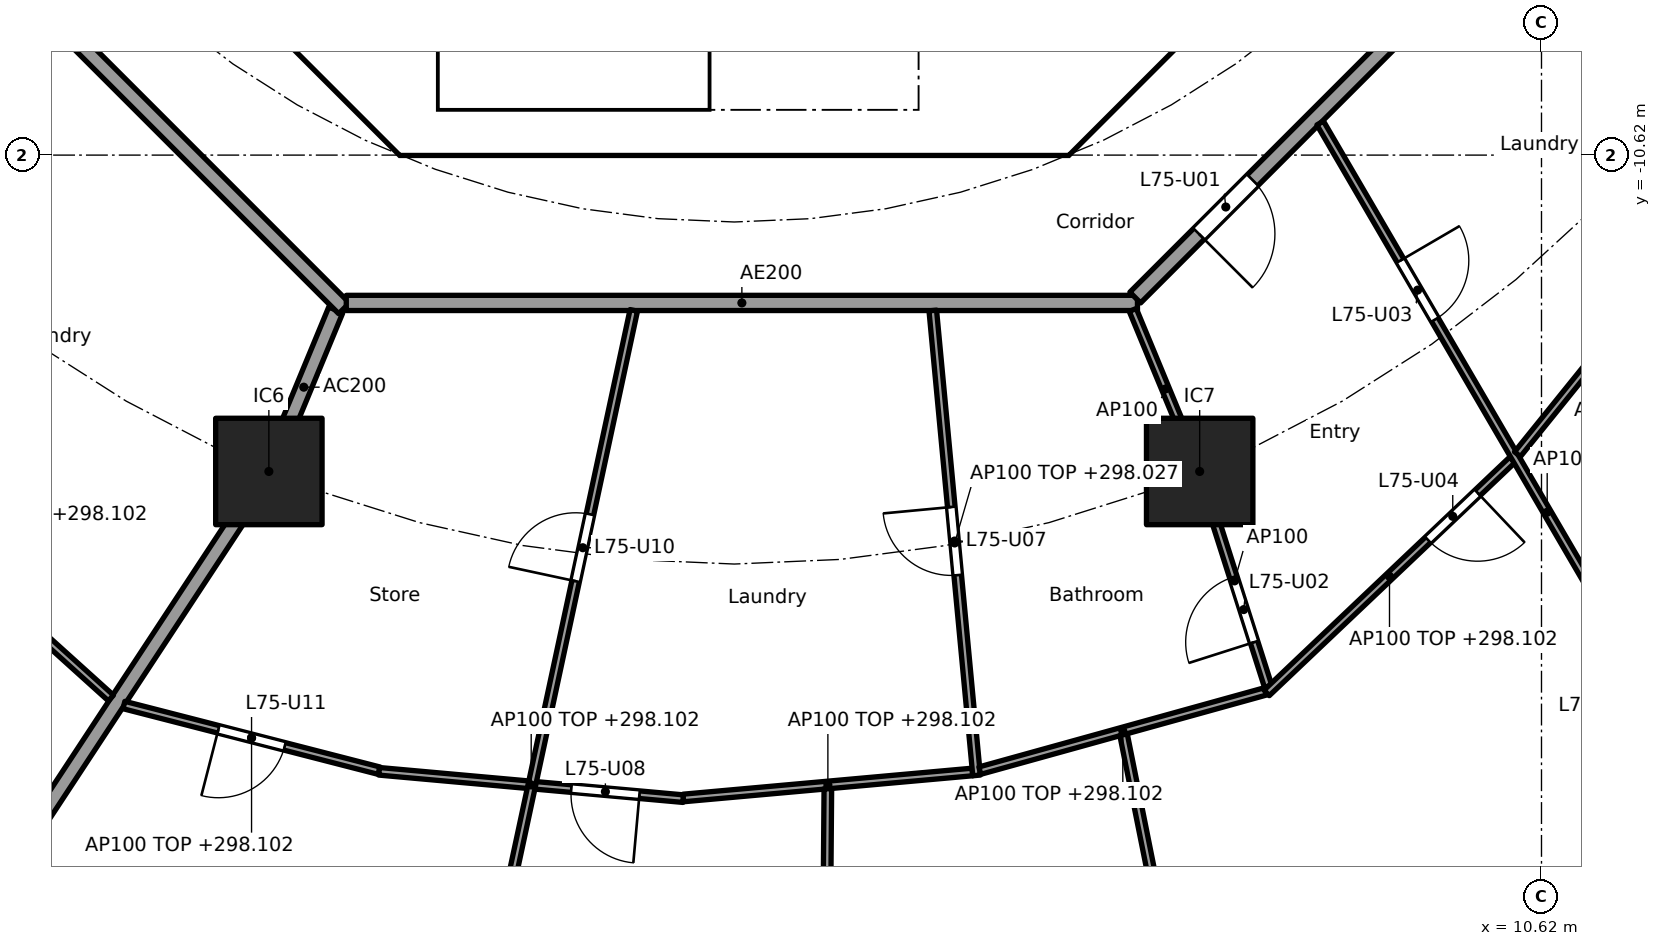
"""IFC4 building model, lengths in metres.
Left out: names, types, materials, properties, quantities, classifications, styles, units other than length and angle.
Written with IfcOpenShell. Run it as: python <this file> out.ifc"""

import sys

from ifc_helpers import new_model, si_unit, direction, frame, frame_2d, origin, origin_2d, place, context, subcontext, project, spatial, polyline, rectangle, outline, extrude, element, fill, save


model = new_model("IFC4")
c1 = context("Model", 3, precision=1e-05, world=origin(), true_north=direction((0.0, 1.0)))
c2 = subcontext(c1, "Body", "Model", "MODEL_VIEW")
j1 = project(units=[si_unit("LENGTHUNIT", "METRE"), si_unit("PLANEANGLEUNIT", "RADIAN")], contexts=[c1])
p1 = place(None, origin())
s1 = spatial("IfcSite", under=j1, at=p1, CompositionType="ELEMENT")
p2 = place(p1, origin())
s2 = spatial("IfcBuilding", under=s1, at=p2, CompositionType="ELEMENT")
p3 = place(p2, frame((0.0, 0.0, 295.5)))
s3 = spatial("IfcBuildingStorey", under=s2, at=p3, CompositionType="ELEMENT", Elevation=295.5)
for number, where, z_axis, x_axis in (
    (1, (-6.123, -14.782, 0.0), (0.0, 0.0, 1.0), (1.0, 0.0, 0.0)),
    (2, (6.123, -14.782, 0.0), (0.0, 0.0, 1.0), (1.0, 0.0, 0.0)),
):
    element("IfcColumn", number, at=place(p3, frame(where, z_axis=z_axis, x_axis=x_axis)), inside=s3, PredefinedType="COLUMN", context=c2, shape_type="SweptSolid", body=[
        extrude(rectangle(XDim=1.4, YDim=1.4, at=origin_2d()), origin(), (0.0, 0.0, 1.0), 3.7),
    ])
p4 = place(p3, frame((-9.988, -4.613, 0.0), z_axis=(0.0, 0.0, 1.0), x_axis=(0.707106781187, -0.707106781187, 0.0)))
e3 = element("IfcWall", 3, at=p4, inside=s3, PredefinedType="SHEAR", context=c2, shape_type="SweptSolid", body=[
    extrude(rectangle(XDim=7.602, YDim=0.6, at=frame_2d((3.801, 0.0))), origin(), (0.0, 0.0, 1.0), 3.28),
])
p5 = place(p4, frame((6.151, 0.0, 0.0)))
e4 = element("IfcOpeningElement", 4, at=p5, cuts=e3, PredefinedType="OPENING", context=c2, shape_type="SweptSolid", body=[
    extrude(rectangle(XDim=1.1, YDim=2.1, at=frame_2d((0.55, 1.05))), frame((0.0, 0.31, 0.0), z_axis=(0.0, -1.0, 0.0), x_axis=(1.0, 0.0, 0.0)), (0.0, 0.0, 1.0), 0.62),
])
p6 = place(p3, frame((4.613, -9.988, 0.0), z_axis=(0.0, 0.0, 1.0), x_axis=(0.707106781187, 0.707106781187, 0.0)))
e5 = element("IfcWall", 5, at=p6, inside=s3, PredefinedType="SHEAR", context=c2, shape_type="SweptSolid", body=[
    extrude(rectangle(XDim=7.602, YDim=0.6, at=frame_2d((3.801, 0.0))), origin(), (0.0, 0.0, 1.0), 3.28),
])
p7 = place(p6, frame((3.201, 0.0, 0.0)))
e6 = element("IfcOpeningElement", 6, at=p7, cuts=e5, PredefinedType="OPENING", context=c2, shape_type="SweptSolid", body=[
    extrude(rectangle(XDim=1.2, YDim=2.1, at=frame_2d((0.6, 1.05))), frame((0.0, 0.31, 0.0), z_axis=(0.0, -1.0, 0.0), x_axis=(1.0, 0.0, 0.0)), (0.0, 0.0, 1.0), 0.62),
])
p8 = place(p3, frame((4.0, -10.025, 0.0), z_axis=(0.0, 0.0, 1.0), x_axis=(0.0, 1.0, 0.0)))
e7 = element("IfcWall", 7, at=p8, inside=s3, PredefinedType="SOLIDWALL", context=c2, shape_type="SweptSolid", body=[
    extrude(rectangle(XDim=3.0, YDim=0.2, at=frame_2d((1.5, 0.0))), origin(), (0.0, 0.0, 1.0), 3.28),
])
p9 = place(p8, frame((0.975, 0.0, 0.0)))
e8 = element("IfcOpeningElement", 8, at=p9, cuts=e7, PredefinedType="OPENING", context=c2, shape_type="SweptSolid", body=[
    extrude(rectangle(XDim=1.1, YDim=2.1, at=frame_2d((0.55, 1.05))), frame((0.0, 0.11, 0.0), z_axis=(0.0, -1.0, 0.0), x_axis=(1.0, 0.0, 0.0)), (0.0, 0.0, 1.0), 0.22),
])
p10 = place(p3, origin())
e9 = element("IfcWall", 9, at=p10, inside=s3, PredefinedType="SHEAR", context=c2, shape_type="SweptSolid", body=[
    extrude(outline(polyline([(-4.152, -10.025), (4.152, -10.025), (4.401, -9.776), (4.825, -10.2), (4.401, -10.625), (-4.401, -10.625), (-4.825, -10.2), (-4.401, -9.776), (-4.152, -10.025)])), origin(), (0.0, 0.0, 1.0), 3.28),
])
p11 = place(p3, origin())
e10 = element("IfcWall", 10, at=p11, inside=s3, PredefinedType="SOLIDWALL", context=c2, shape_type="SweptSolid", body=[
    extrude(outline(polyline([(-3.9, -10.025), (-4.1, -10.025), (-4.1, -7.025), (-3.9, -7.025), (-3.9, -10.025)])), origin(), (0.0, 0.0, 1.0), 3.28),
])
p12 = place(p3, frame((-5.243, -12.657, 0.0), z_axis=(0.0, 0.0, 1.0), x_axis=(-0.382770106157, -0.923843626288, 0.0)))
e11 = element("IfcWall", 11, at=p12, inside=s3, PredefinedType="PARTITIONING", context=c2, shape_type="SweptSolid", body=[
    extrude(rectangle(XDim=2.199, YDim=0.2, at=frame_2d((1.1, 0.0))), origin(), (0.0, 0.0, 1.0), 3.28),
])
p13 = place(p3, frame((-6.151, -14.824, 0.0), z_axis=(0.0, 0.0, 1.0), x_axis=(-0.549345577828, -0.835595258556, 0.0)))
e12 = element("IfcWall", 12, at=p13, inside=s3, PredefinedType="PARTITIONING", context=c2, shape_type="SweptSolid", body=[
    extrude(rectangle(XDim=11.62, YDim=0.2, at=frame_2d((5.81, 0.0))), origin(), (0.0, 0.0, 1.0), 2.602),
])
p14 = place(p3, frame((-12.635, -5.134, 0.0), z_axis=(0.0, 0.0, 1.0), x_axis=(0.707106781187, -0.707106781187, 0.0)))
e13 = element("IfcWall", 13, at=p14, inside=s3, PredefinedType="PARTITIONING", context=c2, shape_type="SweptSolid", body=[
    extrude(rectangle(XDim=10.609, YDim=0.2, at=frame_2d((5.305, 0.0))), origin(), (0.0, 0.0, 1.0), 3.28),
])
p15 = place(p3, frame((-5.104, -12.565, 0.0), z_axis=(0.0, 0.0, 1.0), x_axis=(1.0, 0.0, 0.0)))
e14 = element("IfcWall", 14, at=p15, inside=s3, PredefinedType="PARTITIONING", context=c2, shape_type="SweptSolid", body=[
    extrude(rectangle(XDim=10.409, YDim=0.2, at=frame_2d((5.205, 0.0))), origin(), (0.0, 0.0, 1.0), 3.28),
])
p16 = place(p3, frame((5.275, -12.494, 0.0), z_axis=(0.0, 0.0, 1.0), x_axis=(0.707106781187, 0.707106781187, 0.0)))
e15 = element("IfcWall", 15, at=p16, inside=s3, PredefinedType="PARTITIONING", context=c2, shape_type="SweptSolid", body=[
    extrude(rectangle(XDim=10.409, YDim=0.2, at=frame_2d((5.205, 0.0))), origin(), (0.0, 0.0, 1.0), 3.28),
])
p17 = place(p16, frame((1.185, 0.0, 0.0)))
e16 = element("IfcOpeningElement", 16, at=p17, cuts=e15, PredefinedType="OPENING", context=c2, shape_type="SweptSolid", body=[
    extrude(rectangle(XDim=1.0, YDim=2.1, at=frame_2d((0.5, 1.05))), frame((0.0, 0.11, 0.0), z_axis=(0.0, -1.0, 0.0), x_axis=(1.0, 0.0, 0.0)), (0.0, 0.0, 1.0), 0.22),
])
p18 = place(p3, frame((-8.958, -8.952, 0.0), z_axis=(0.0, 0.0, 1.0), x_axis=(-0.73876526954, -0.673962815385, 0.0)))
e17 = element("IfcWall", 17, at=p18, inside=s3, PredefinedType="PARTITIONING", context=c2, shape_type="SweptSolid", body=[
    extrude(rectangle(XDim=5.647, YDim=0.1, at=frame_2d((2.824, 0.0))), origin(), (0.0, 0.0, 1.0), 2.527),
])
p19 = place(p3, frame((-11.676, -14.628, 0.0), z_axis=(0.0, 0.0, 1.0), x_axis=(0.74245829867, -0.669892285921, 0.0)))
e18 = element("IfcWall", 18, at=p19, inside=s3, PredefinedType="PARTITIONING", context=c2, shape_type="SweptSolid", body=[
    extrude(rectangle(XDim=4.68, YDim=0.1, at=frame_2d((2.34, 0.0))), origin(), (0.0, 0.0, 1.0), 2.602),
])
p20 = place(p3, frame((-8.03, -17.854, 0.0), z_axis=(0.0, 0.0, 1.0), x_axis=(0.968441967324, -0.249239154077, 0.0)))
e19 = element("IfcWall", 19, at=p20, inside=s3, PredefinedType="PARTITIONING", context=c2, shape_type="SweptSolid", body=[
    extrude(rectangle(XDim=3.468, YDim=0.1, at=frame_2d((1.734, 0.0))), origin(), (0.0, 0.0, 1.0), 2.602),
])
p21 = place(p20, frame((1.284, 0.0, 0.0)))
e20 = element("IfcOpeningElement", 20, at=p21, cuts=e19, PredefinedType="OPENING", context=c2, shape_type="SweptSolid", body=[
    extrude(rectangle(XDim=0.9, YDim=2.1, at=frame_2d((0.45, 1.05))), frame((0.0, 0.06, 0.0), z_axis=(0.0, -1.0, 0.0), x_axis=(1.0, 0.0, 0.0)), (0.0, 0.0, 1.0), 0.12),
])
p22 = place(p3, frame((-4.673, -18.727, 0.0), z_axis=(0.0, 0.0, 1.0), x_axis=(0.995982840882, -0.089544294447, 0.0)))
e21 = element("IfcWall", 21, at=p22, inside=s3, PredefinedType="PARTITIONING", context=c2, shape_type="SweptSolid", body=[
    extrude(rectangle(XDim=4.019, YDim=0.1, at=frame_2d((2.009, 0.0))), origin(), (0.0, 0.0, 1.0), 2.602),
])
p23 = place(p22, frame((2.539, 0.0, 0.0)))
e22 = element("IfcOpeningElement", 22, at=p23, cuts=e21, PredefinedType="OPENING", context=c2, shape_type="SweptSolid", body=[
    extrude(rectangle(XDim=0.9, YDim=2.1, at=frame_2d((0.45, 1.05))), frame((0.0, 0.06, 0.0), z_axis=(0.0, -1.0, 0.0), x_axis=(1.0, 0.0, 0.0)), (0.0, 0.0, 1.0), 0.12),
])
p24 = place(p3, frame((-1.322, -12.663, 0.0), z_axis=(0.0, 0.0, 1.0), x_axis=(-0.209957681159, -0.97771047459, 0.0)))
e23 = element("IfcWall", 23, at=p24, inside=s3, PredefinedType="PARTITIONING", context=c2, shape_type="SweptSolid", body=[
    extrude(rectangle(XDim=16.299, YDim=0.1, at=frame_2d((8.149, 0.0))), origin(), (0.0, 0.0, 1.0), 2.527),
])
p25 = place(p24, frame((2.744, 0.0, 0.0)))
e24 = element("IfcOpeningElement", 24, at=p25, cuts=e23, PredefinedType="OPENING", context=c2, shape_type="SweptSolid", body=[
    extrude(rectangle(XDim=0.9, YDim=2.1, at=frame_2d((0.45, 1.05))), frame((0.0, 0.06, 0.0), z_axis=(0.0, -1.0, 0.0), x_axis=(1.0, 0.0, 0.0)), (0.0, 0.0, 1.0), 0.12),
])
p26 = place(p3, frame((-0.67, -19.077, 0.0), z_axis=(0.0, 0.0, 1.0), x_axis=(0.995986472869, 0.089503887414, 0.0)))
e25 = element("IfcWall", 25, at=p26, inside=s3, PredefinedType="PARTITIONING", context=c2, shape_type="SweptSolid", body=[
    extrude(rectangle(XDim=3.819, YDim=0.1, at=frame_2d((1.909, 0.0))), origin(), (0.0, 0.0, 1.0), 2.602),
])
p27 = place(p3, frame((1.231, -18.957, 0.0), z_axis=(0.0, 0.0, 1.0), x_axis=(-0.008128577452, -0.999966962569, 0.0)))
e26 = element("IfcWall", 26, at=p27, inside=s3, PredefinedType="PARTITIONING", context=c2, shape_type="SweptSolid", body=[
    extrude(rectangle(XDim=9.641, YDim=0.1, at=frame_2d((4.821, 0.0))), origin(), (0.0, 0.0, 1.0), 2.745),
])
p28 = place(p3, frame((2.612, -12.664, 0.0), z_axis=(0.0, 0.0, 1.0), x_axis=(0.093781393779, -0.995592813444, 0.0)))
e27 = element("IfcWall", 27, at=p28, inside=s3, PredefinedType="PARTITIONING", context=c2, shape_type="SweptSolid", body=[
    extrude(rectangle(XDim=6.144, YDim=0.1, at=frame_2d((3.072, 0.0))), origin(), (0.0, 0.0, 1.0), 2.527),
])
p29 = place(p28, frame((2.597, 0.0, 0.0)))
e28 = element("IfcOpeningElement", 28, at=p29, cuts=e27, PredefinedType="OPENING", context=c2, shape_type="SweptSolid", body=[
    extrude(rectangle(XDim=0.9, YDim=2.1, at=frame_2d((0.45, 1.05))), frame((0.0, 0.06, 0.0), z_axis=(0.0, -1.0, 0.0), x_axis=(1.0, 0.0, 0.0)), (0.0, 0.0, 1.0), 0.12),
])
p30 = place(p3, frame((3.231, -18.718, 0.0), z_axis=(0.0, 0.0, 1.0), x_axis=(0.963601204771, 0.267343820136, 0.0)))
e29 = element("IfcWall", 29, at=p30, inside=s3, PredefinedType="PARTITIONING", context=c2, shape_type="SweptSolid", body=[
    extrude(rectangle(XDim=3.903, YDim=0.1, at=frame_2d((1.952, 0.0))), origin(), (0.0, 0.0, 1.0), 2.602),
])
p31 = place(p3, frame((5.122, -18.245, 0.0), z_axis=(0.0, 0.0, 1.0), x_axis=(0.196554332808, -0.980492934322, 0.0)))
e30 = element("IfcWall", 30, at=p31, inside=s3, PredefinedType="PARTITIONING", context=c2, shape_type="SweptSolid", body=[
    extrude(rectangle(XDim=8.785, YDim=0.1, at=frame_2d((4.393, 0.0))), origin(), (0.0, 0.0, 1.0), 2.745),
])
p32 = place(p31, frame((3.943, 0.0, 0.0)))
e31 = element("IfcOpeningElement", 31, at=p32, cuts=e30, PredefinedType="OPENING", context=c2, shape_type="SweptSolid", body=[
    extrude(rectangle(XDim=0.9, YDim=2.1, at=frame_2d((0.45, 1.05))), frame((0.0, 0.06, 0.0), z_axis=(0.0, -1.0, 0.0), x_axis=(1.0, 0.0, 0.0)), (0.0, 0.0, 1.0), 0.12),
])
p33 = place(p3, frame((5.243, -12.657, 0.0), z_axis=(0.0, 0.0, 1.0), x_axis=(0.382719158442, -0.923864733477, 0.0)))
e32 = element("IfcWall", 32, at=p33, inside=s3, PredefinedType="PARTITIONING", context=c2, shape_type="SweptSolid", body=[
    extrude(rectangle(XDim=2.25, YDim=0.1, at=frame_2d((1.125, 0.0))), origin(), (0.0, 0.0, 1.0), 3.28),
])
p34 = place(p3, frame((6.138, -14.83, 0.0), z_axis=(0.0, 0.0, 1.0), x_axis=(0.303665801704, -0.952778610631, 0.0)))
e33 = element("IfcWall", 33, at=p34, inside=s3, PredefinedType="PARTITIONING", context=c2, shape_type="SweptSolid", body=[
    extrude(rectangle(XDim=2.922, YDim=0.1, at=frame_2d((1.461, 0.0))), origin(), (0.0, 0.0, 1.0), 3.28),
])
p35 = place(p34, frame((1.407, 0.0, 0.0)))
e34 = element("IfcOpeningElement", 34, at=p35, cuts=e33, PredefinedType="OPENING", context=c2, shape_type="SweptSolid", body=[
    extrude(rectangle(XDim=0.9, YDim=2.1, at=frame_2d((0.45, 1.05))), frame((0.0, 0.06, 0.0), z_axis=(0.0, -1.0, 0.0), x_axis=(1.0, 0.0, 0.0)), (0.0, 0.0, 1.0), 0.12),
])
p36 = place(p3, frame((7.004, -17.695, 0.0), z_axis=(0.0, 0.0, 1.0), x_axis=(0.725438442765, 0.68828705186, 0.0)))
e35 = element("IfcWall", 35, at=p36, inside=s3, PredefinedType="PARTITIONING", context=c2, shape_type="SweptSolid", body=[
    extrude(rectangle(XDim=4.456, YDim=0.1, at=frame_2d((2.228, 0.0))), origin(), (0.0, 0.0, 1.0), 2.602),
])
p37 = place(p36, frame((2.925, 0.0, 0.0)))
e36 = element("IfcOpeningElement", 36, at=p37, cuts=e35, PredefinedType="OPENING", context=c2, shape_type="SweptSolid", body=[
    extrude(rectangle(XDim=0.9, YDim=2.1, at=frame_2d((0.45, 1.05))), frame((0.0, 0.06, 0.0), z_axis=(0.0, -1.0, 0.0), x_axis=(1.0, 0.0, 0.0)), (0.0, 0.0, 1.0), 0.12),
])
p38 = place(p3, frame((7.708, -10.198, 0.0), z_axis=(0.0, 0.0, 1.0), x_axis=(0.503839015963, -0.863797572347, 0.0)))
e37 = element("IfcWall", 37, at=p38, inside=s3, PredefinedType="PARTITIONING", context=c2, shape_type="SweptSolid", body=[
    extrude(rectangle(XDim=11.856, YDim=0.1, at=frame_2d((5.928, 0.0))), origin(), (0.0, 0.0, 1.0), 2.527),
])
p39 = place(p38, frame((2.095, 0.0, 0.0)))
e38 = element("IfcOpeningElement", 38, at=p39, cuts=e37, PredefinedType="OPENING", context=c2, shape_type="SweptSolid", body=[
    extrude(rectangle(XDim=0.9, YDim=2.1, at=frame_2d((0.45, 1.05))), frame((0.0, 0.06, 0.0), z_axis=(0.0, -1.0, 0.0), x_axis=(1.0, 0.0, 0.0)), (0.0, 0.0, 1.0), 0.12),
])
p40 = place(p38, frame((8.023, 0.0, 0.0)))
e39 = element("IfcOpeningElement", 39, at=p40, cuts=e37, PredefinedType="OPENING", context=c2, shape_type="SweptSolid", body=[
    extrude(rectangle(XDim=0.9, YDim=2.1, at=frame_2d((0.45, 1.05))), frame((0.0, 0.06, 0.0), z_axis=(0.0, -1.0, 0.0), x_axis=(1.0, 0.0, 0.0)), (0.0, 0.0, 1.0), 0.12),
])
p41 = place(p3, frame((10.304, -14.555, 0.0), z_axis=(0.0, 0.0, 1.0), x_axis=(0.628170338674, 0.778075848237, 0.0)))
e40 = element("IfcWall", 40, at=p41, inside=s3, PredefinedType="PARTITIONING", context=c2, shape_type="SweptSolid", body=[
    extrude(rectangle(XDim=4.532, YDim=0.1, at=frame_2d((2.266, 0.0))), origin(), (0.0, 0.0, 1.0), 2.602),
])
p42 = place(p5, origin())
e41 = element("IfcDoor", 41, at=p42, inside=s3, OperationType="SINGLE_SWING_RIGHT", PredefinedType="DOOR", context=c2, shape_type="SweptSolid", body=[
    extrude(rectangle(XDim=1.1, YDim=2.1, at=frame_2d((0.55, 1.05))), frame((0.0, 0.025, 0.0), z_axis=(0.0, -1.0, 0.0), x_axis=(1.0, 0.0, 0.0)), (0.0, 0.0, 1.0), 0.05),
])
fill(e4, e41)
p43 = place(p17, frame((1.0, 0.0, 0.0), x_axis=(-1.0, 0.0, 0.0)))
e42 = element("IfcDoor", 42, at=p43, inside=s3, OperationType="SINGLE_SWING_RIGHT", PredefinedType="DOOR", context=c2, shape_type="SweptSolid", body=[
    extrude(rectangle(XDim=1.0, YDim=2.1, at=frame_2d((0.5, 1.05))), frame((0.0, 0.025, 0.0), z_axis=(0.0, -1.0, 0.0), x_axis=(1.0, 0.0, 0.0)), (0.0, 0.0, 1.0), 0.05),
])
fill(e16, e42)
p44 = place(p35, frame((0.9, 0.0, 0.0), x_axis=(-1.0, 0.0, 0.0)))
e43 = element("IfcDoor", 43, at=p44, inside=s3, OperationType="SINGLE_SWING_LEFT", PredefinedType="DOOR", context=c2, shape_type="SweptSolid", body=[
    extrude(rectangle(XDim=0.9, YDim=2.1, at=frame_2d((0.45, 1.05))), frame((0.0, 0.025, 0.0), z_axis=(0.0, -1.0, 0.0), x_axis=(1.0, 0.0, 0.0)), (0.0, 0.0, 1.0), 0.05),
])
fill(e34, e43)
p45 = place(p39, origin())
e44 = element("IfcDoor", 44, at=p45, inside=s3, OperationType="SINGLE_SWING_LEFT", PredefinedType="DOOR", context=c2, shape_type="SweptSolid", body=[
    extrude(rectangle(XDim=0.9, YDim=2.1, at=frame_2d((0.45, 1.05))), frame((0.0, 0.025, 0.0), z_axis=(0.0, -1.0, 0.0), x_axis=(1.0, 0.0, 0.0)), (0.0, 0.0, 1.0), 0.05),
])
fill(e38, e44)
p46 = place(p37, frame((0.9, 0.0, 0.0), x_axis=(-1.0, 0.0, 0.0)))
e45 = element("IfcDoor", 45, at=p46, inside=s3, OperationType="SINGLE_SWING_LEFT", PredefinedType="DOOR", context=c2, shape_type="SweptSolid", body=[
    extrude(rectangle(XDim=0.9, YDim=2.1, at=frame_2d((0.45, 1.05))), frame((0.0, 0.025, 0.0), z_axis=(0.0, -1.0, 0.0), x_axis=(1.0, 0.0, 0.0)), (0.0, 0.0, 1.0), 0.05),
])
fill(e36, e45)
p47 = place(p29, frame((0.9, 0.0, 0.0), x_axis=(-1.0, 0.0, 0.0)))
e46 = element("IfcDoor", 46, at=p47, inside=s3, OperationType="SINGLE_SWING_RIGHT", PredefinedType="DOOR", context=c2, shape_type="SweptSolid", body=[
    extrude(rectangle(XDim=0.9, YDim=2.1, at=frame_2d((0.45, 1.05))), frame((0.0, 0.025, 0.0), z_axis=(0.0, -1.0, 0.0), x_axis=(1.0, 0.0, 0.0)), (0.0, 0.0, 1.0), 0.05),
])
fill(e28, e46)
p48 = place(p23, frame((0.9, 0.0, 0.0), x_axis=(-1.0, 0.0, 0.0)))
e47 = element("IfcDoor", 47, at=p48, inside=s3, OperationType="SINGLE_SWING_LEFT", PredefinedType="DOOR", context=c2, shape_type="SweptSolid", body=[
    extrude(rectangle(XDim=0.9, YDim=2.1, at=frame_2d((0.45, 1.05))), frame((0.0, 0.025, 0.0), z_axis=(0.0, -1.0, 0.0), x_axis=(1.0, 0.0, 0.0)), (0.0, 0.0, 1.0), 0.05),
])
fill(e22, e47)
p49 = place(p25, frame((0.9, 0.0, 0.0), x_axis=(-1.0, 0.0, 0.0)))
e48 = element("IfcDoor", 48, at=p49, inside=s3, OperationType="SINGLE_SWING_LEFT", PredefinedType="DOOR", context=c2, shape_type="SweptSolid", body=[
    extrude(rectangle(XDim=0.9, YDim=2.1, at=frame_2d((0.45, 1.05))), frame((0.0, 0.025, 0.0), z_axis=(0.0, -1.0, 0.0), x_axis=(1.0, 0.0, 0.0)), (0.0, 0.0, 1.0), 0.05),
])
fill(e24, e48)
p50 = place(p21, frame((0.9, 0.0, 0.0), x_axis=(-1.0, 0.0, 0.0)))
e49 = element("IfcDoor", 49, at=p50, inside=s3, OperationType="SINGLE_SWING_RIGHT", PredefinedType="DOOR", context=c2, shape_type="SweptSolid", body=[
    extrude(rectangle(XDim=0.9, YDim=2.1, at=frame_2d((0.45, 1.05))), frame((0.0, 0.025, 0.0), z_axis=(0.0, -1.0, 0.0), x_axis=(1.0, 0.0, 0.0)), (0.0, 0.0, 1.0), 0.05),
])
fill(e20, e49)
save(model, sys.argv[1])
